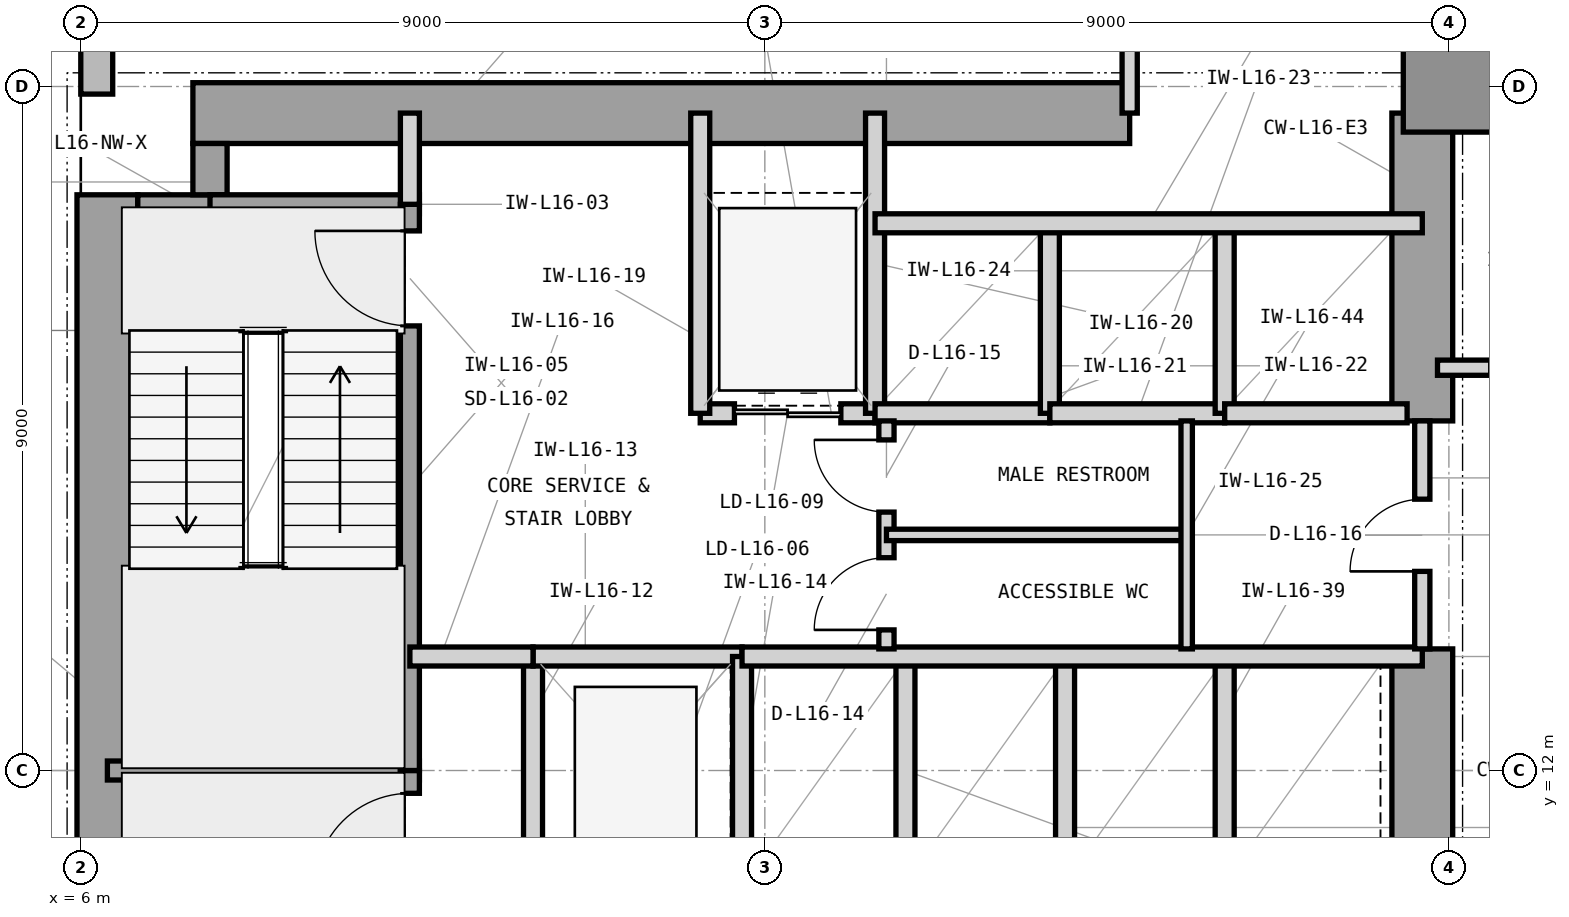
"""IFC4 building model, lengths in metres.
Left out: names, types, materials, properties, quantities, classifications, styles, units other than length and angle.
Written with IfcOpenShell. Run it as: python <this file> out.ifc"""

import sys

from ifc_helpers import new_model, si_unit, direction, frame, frame_2d, origin, origin_2d, place, context, subcontext, project, spatial, rectangle, extrude, element, fill, save


model = new_model("IFC4")
c1 = context("Model", 3, precision=1e-05, world=origin(), true_north=direction((0.0, 1.0)))
c2 = subcontext(c1, "Body", "Model", "MODEL_VIEW")
j1 = project(units=[si_unit("LENGTHUNIT", "METRE"), si_unit("PLANEANGLEUNIT", "RADIAN")], contexts=[c1])
p1 = place(None, origin())
s1 = spatial("IfcSite", under=j1, at=p1, CompositionType="ELEMENT")
p2 = place(p1, origin())
s2 = spatial("IfcBuilding", under=s1, at=p2, CompositionType="ELEMENT")
p3 = place(p2, frame((0.0, 0.0, 72.0)))
s3 = spatial("IfcBuildingStorey", under=s2, at=p3, CompositionType="ELEMENT", Elevation=72.0)
p4 = place(p3, frame((6.35, 4.425, 0.0), z_axis=(0.0, 0.0, 1.0), x_axis=(0.0, 1.0, 0.0)))
e1 = element("IfcWall", 1, at=p4, inside=s3, PredefinedType="SHEAR", context=c2, shape_type="SweptSolid", body=[
    extrude(rectangle(XDim=15.15, YDim=0.8, at=frame_2d((7.575, 0.0))), origin(), (0.0, 0.0, 1.0), 4.2),
])
p5 = place(p3, frame((7.475, 20.65, 0.0), z_axis=(0.0, 0.0, 1.0), x_axis=(1.0, 0.0, 0.0)))
e2 = element("IfcWall", 2, at=p5, inside=s3, PredefinedType="SHEAR", context=c2, shape_type="SweptSolid", body=[
    extrude(rectangle(XDim=12.325, YDim=0.8, at=frame_2d((6.163, 0.0))), origin(), (0.0, 0.0, 1.0), 4.2),
])
p6 = place(p3, frame((23.65, 10.4, 0.0), z_axis=(0.0, 0.0, 1.0), x_axis=(0.0, 1.0, 0.0)))
e3 = element("IfcWall", 3, at=p6, inside=s3, PredefinedType="SHEAR", context=c2, shape_type="SweptSolid", body=[
    extrude(rectangle(XDim=3.2, YDim=0.8, at=frame_2d((1.6, 0.0))), origin(), (0.0, 0.0, 1.0), 4.2),
])
p7 = place(p3, frame((23.65, 16.6, 0.0), z_axis=(0.0, 0.0, 1.0), x_axis=(0.0, 1.0, 0.0)))
e4 = element("IfcWall", 4, at=p7, inside=s3, PredefinedType="SHEAR", context=c2, shape_type="SweptSolid", body=[
    extrude(rectangle(XDim=4.05, YDim=0.8, at=frame_2d((2.025, 0.0))), origin(), (0.0, 0.0, 1.0), 4.2),
])
p8 = place(p3, frame((6.75, 19.35, 0.0), z_axis=(0.0, 0.0, 1.0), x_axis=(1.0, 0.0, 0.0)))
e5 = element("IfcWall", 5, at=p8, inside=s3, PredefinedType="SHEAR", context=c2, shape_type="SweptSolid", body=[
    extrude(rectangle(XDim=1.175, YDim=0.45, at=frame_2d((0.587, 0.0))), origin(), (0.0, 0.0, 1.0), 4.2),
])
p9 = place(p3, frame((7.7, 19.575, 0.0), z_axis=(0.0, 0.0, 1.0), x_axis=(0.0, 1.0, 0.0)))
e6 = element("IfcWall", 6, at=p9, inside=s3, PredefinedType="SHEAR", context=c2, shape_type="SweptSolid", body=[
    extrude(rectangle(XDim=0.675, YDim=0.45, at=frame_2d((0.337, 0.0))), origin(), (0.0, 0.0, 1.0), 4.2),
])
p10 = place(p3, frame((24.0, 21.0, 0.0), z_axis=(0.0, 0.0, 1.0), x_axis=(1.0, 0.0, 0.0)))
e7 = element("IfcColumn", 7, at=p10, inside=s3, PredefinedType="COLUMN", context=c2, shape_type="SweptSolid", body=[
    extrude(rectangle(XDim=1.2, YDim=1.2, at=origin_2d()), origin(), (0.0, 0.0, 1.0), 4.2),
])
p11 = place(p3, frame((64.4, 20.79, 0.0), z_axis=(0.0, 0.0, 1.0), x_axis=(-1.0, 0.0, 0.0)))
e8 = element("IfcWall", 8, at=p11, inside=s3, PredefinedType="STANDARD", context=c2, shape_type="SweptSolid", body=[
    extrude(rectangle(XDim=40.4, YDim=0.42, at=frame_2d((20.2, 0.0))), origin(), (0.0, 0.0, 1.0), 3.98),
])
p12 = place(p11, frame((26.375, 0.0, 0.85)))
e9 = element("IfcOpeningElement", 9, at=p12, cuts=e8, PredefinedType="OPENING", context=c2, shape_type="SweptSolid", body=[
    extrude(rectangle(XDim=2.8, YDim=2.45, at=frame_2d((1.4, 1.225))), frame((0.0, 0.22, 0.0), z_axis=(0.0, -1.0, 0.0), x_axis=(1.0, 0.0, 0.0)), (0.0, 0.0, 1.0), 0.44),
])
p13 = place(p11, frame((38.222, 0.0, 0.85)))
e10 = element("IfcOpeningElement", 10, at=p13, cuts=e8, PredefinedType="OPENING", context=c2, shape_type="SweptSolid", body=[
    extrude(rectangle(XDim=1.2, YDim=2.45, at=frame_2d((0.6, 1.225))), frame((0.0, 0.22, 0.0), z_axis=(0.0, -1.0, 0.0), x_axis=(1.0, 0.0, 0.0)), (0.0, 0.0, 1.0), 0.44),
])
p14 = place(p11, frame((32.536, 0.0, 0.85)))
e11 = element("IfcOpeningElement", 11, at=p14, cuts=e8, PredefinedType="OPENING", context=c2, shape_type="SweptSolid", body=[
    extrude(rectangle(XDim=2.8, YDim=2.45, at=frame_2d((1.4, 1.225))), frame((0.0, 0.22, 0.0), z_axis=(0.0, -1.0, 0.0), x_axis=(1.0, 0.0, 0.0)), (0.0, 0.0, 1.0), 0.44),
])
p15 = place(p11, frame((17.386, 0.0, 0.85)))
e12 = element("IfcOpeningElement", 12, at=p15, cuts=e8, PredefinedType="OPENING", context=c2, shape_type="SweptSolid", body=[
    extrude(rectangle(XDim=2.8, YDim=2.45, at=frame_2d((1.4, 1.225))), frame((0.0, 0.22, 0.0), z_axis=(0.0, -1.0, 0.0), x_axis=(1.0, 0.0, 0.0)), (0.0, 0.0, 1.0), 0.44),
])
p16 = place(p3, frame((23.79, 21.0, 0.0), z_axis=(0.0, 0.0, 1.0), x_axis=(0.0, 1.0, 0.0)))
e13 = element("IfcWall", 13, at=p16, inside=s3, PredefinedType="STANDARD", context=c2, shape_type="SweptSolid", body=[
    extrude(rectangle(XDim=28.4, YDim=0.42, at=frame_2d((14.2, 0.0))), origin(), (0.0, 0.0, 1.0), 3.98),
])
p17 = place(p16, frame((10.433, 0.0, 0.85)))
e14 = element("IfcOpeningElement", 14, at=p17, cuts=e13, PredefinedType="OPENING", context=c2, shape_type="SweptSolid", body=[
    extrude(rectangle(XDim=2.8, YDim=2.45, at=frame_2d((1.4, 1.225))), frame((0.0, 0.22, 0.0), z_axis=(0.0, -1.0, 0.0), x_axis=(1.0, 0.0, 0.0)), (0.0, 0.0, 1.0), 0.44),
])
p18 = place(p16, frame((16.016, 0.0, 0.85)))
e15 = element("IfcOpeningElement", 15, at=p18, cuts=e13, PredefinedType="OPENING", context=c2, shape_type="SweptSolid", body=[
    extrude(rectangle(XDim=1.2, YDim=2.45, at=frame_2d((0.6, 1.225))), frame((0.0, 0.22, 0.0), z_axis=(0.0, -1.0, 0.0), x_axis=(1.0, 0.0, 0.0)), (0.0, 0.0, 1.0), 0.44),
])
p19 = place(p3, frame((6.21, 49.4, 0.0), z_axis=(0.0, 0.0, 1.0), x_axis=(0.0, -1.0, 0.0)))
e16 = element("IfcWall", 16, at=p19, inside=s3, PredefinedType="STANDARD", context=c2, shape_type="SweptSolid", body=[
    extrude(rectangle(XDim=28.5, YDim=0.42, at=frame_2d((14.25, 0.0))), origin(), (0.0, 0.0, 1.0), 3.98),
])
p20 = place(p19, frame((15.225, 0.0, 0.85)))
e17 = element("IfcOpeningElement", 17, at=p20, cuts=e16, PredefinedType="OPENING", context=c2, shape_type="SweptSolid", body=[
    extrude(rectangle(XDim=2.8, YDim=2.45, at=frame_2d((1.4, 1.225))), frame((0.0, 0.22, 0.0), z_axis=(0.0, -1.0, 0.0), x_axis=(1.0, 0.0, 0.0)), (0.0, 0.0, 1.0), 0.44),
])
p21 = place(p3, frame((6.35, 12.0, 0.0), z_axis=(0.0, 0.0, 1.0), x_axis=(1.0, 0.0, 0.0)))
e18 = element("IfcWall", 18, at=p21, inside=s3, PredefinedType="SHEAR", context=c2, shape_type="SweptSolid", body=[
    extrude(rectangle(XDim=4.105, YDim=0.25, at=frame_2d((2.052, 0.0))), origin(), (0.0, 0.0, 1.0), 4.2),
])
p22 = place(p3, frame((7.7, 19.45, 0.0), z_axis=(0.0, 0.0, 1.0), x_axis=(1.0, 0.0, 0.0)))
e19 = element("IfcWall", 19, at=p22, inside=s3, PredefinedType="SHEAR", context=c2, shape_type="SweptSolid", body=[
    extrude(rectangle(XDim=2.755, YDim=0.25, at=frame_2d((1.377, 0.0))), origin(), (0.0, 0.0, 1.0), 4.2),
])
p23 = place(p3, frame((10.33, 4.55, 0.0), z_axis=(0.0, 0.0, 1.0), x_axis=(0.0, 1.0, 0.0)))
e20 = element("IfcWall", 20, at=p23, inside=s3, PredefinedType="SHEAR", context=c2, shape_type="SweptSolid", body=[
    extrude(rectangle(XDim=7.45, YDim=0.25, at=frame_2d((3.725, 0.0))), origin(), (0.0, 0.0, 1.0), 4.2),
])
p24 = place(p23, frame((5.9, 0.0, 0.0)))
e21 = element("IfcOpeningElement", 21, at=p24, cuts=e20, PredefinedType="OPENING", context=c2, shape_type="SweptSolid", body=[
    extrude(rectangle(XDim=1.25, YDim=2.2, at=frame_2d((0.625, 1.1))), frame((0.0, 0.135, 0.0), z_axis=(0.0, -1.0, 0.0), x_axis=(1.0, 0.0, 0.0)), (0.0, 0.0, 1.0), 0.27),
])
p25 = place(p3, frame((10.33, 12.0, 0.0), z_axis=(0.0, 0.0, 1.0), x_axis=(0.0, 1.0, 0.0)))
e22 = element("IfcWall", 22, at=p25, inside=s3, PredefinedType="SHEAR", context=c2, shape_type="SweptSolid", body=[
    extrude(rectangle(XDim=7.45, YDim=0.25, at=frame_2d((3.725, 0.0))), origin(), (0.0, 0.0, 1.0), 4.2),
])
p26 = place(p25, frame((5.85, 0.0, 0.0)))
e23 = element("IfcOpeningElement", 23, at=p26, cuts=e22, PredefinedType="OPENING", context=c2, shape_type="SweptSolid", body=[
    extrude(rectangle(XDim=1.25, YDim=2.2, at=frame_2d((0.625, 1.1))), frame((0.0, 0.135, 0.0), z_axis=(0.0, -1.0, 0.0), x_axis=(1.0, 0.0, 0.0)), (0.0, 0.0, 1.0), 0.27),
])
p27 = place(p3, frame((10.33, 19.45, 0.0), z_axis=(0.0, 0.0, 1.0), x_axis=(0.0, 1.0, 0.0)))
e24 = element("IfcWall", 24, at=p27, inside=s3, PredefinedType="PARTITIONING", context=c2, shape_type="SweptSolid", body=[
    extrude(rectangle(XDim=1.2, YDim=0.25, at=frame_2d((0.6, 0.0))), origin(), (0.0, 0.0, 1.0), 3.114),
])
p28 = place(p3, frame((11.95, 10.5, 0.0), z_axis=(0.0, 0.0, 1.0), x_axis=(0.0, 1.0, 0.0)))
e25 = element("IfcWall", 25, at=p28, inside=s3, PredefinedType="PARTITIONING", context=c2, shape_type="SweptSolid", body=[
    extrude(rectangle(XDim=3.0, YDim=0.25, at=frame_2d((1.5, 0.0))), origin(), (0.0, 0.0, 1.0), 3.97),
])
p29 = place(p3, frame((11.95, 13.5, 0.0), z_axis=(0.0, 0.0, 1.0), x_axis=(1.0, 0.0, 0.0)))
e26 = element("IfcWall", 26, at=p29, inside=s3, PredefinedType="PARTITIONING", context=c2, shape_type="SweptSolid", body=[
    extrude(rectangle(XDim=2.75, YDim=0.25, at=frame_2d((1.375, 0.0))), origin(), (0.0, 0.0, 1.0), 3.426),
])
p30 = place(p3, frame((14.7, 10.5, 0.0), z_axis=(0.0, 0.0, 1.0), x_axis=(0.0, 1.0, 0.0)))
e27 = element("IfcWall", 27, at=p30, inside=s3, PredefinedType="PARTITIONING", context=c2, shape_type="SweptSolid", body=[
    extrude(rectangle(XDim=3.0, YDim=0.25, at=frame_2d((1.5, 0.0))), origin(), (0.0, 0.0, 1.0), 3.97),
])
p31 = place(p3, frame((10.33, 13.5, 0.0), z_axis=(0.0, 0.0, 1.0), x_axis=(1.0, 0.0, 0.0)))
e28 = element("IfcWall", 28, at=p31, inside=s3, PredefinedType="PARTITIONING", context=c2, shape_type="SweptSolid", body=[
    extrude(rectangle(XDim=1.62, YDim=0.25, at=frame_2d((0.81, 0.0))), origin(), (0.0, 0.0, 1.0), 3.426),
])
p32 = place(p3, frame((14.15, 16.7, 0.0), z_axis=(0.0, 0.0, 1.0), x_axis=(1.0, 0.0, 0.0)))
e29 = element("IfcWall", 29, at=p32, inside=s3, PredefinedType="PARTITIONING", context=c2, shape_type="SweptSolid", body=[
    extrude(rectangle(XDim=2.3, YDim=0.25, at=frame_2d((1.15, 0.0))), origin(), (0.0, 0.0, 1.0), 3.426),
])
p33 = place(p32, frame((0.45, 0.0, 0.0)))
e30 = element("IfcOpeningElement", 30, at=p33, cuts=e29, PredefinedType="OPENING", context=c2, shape_type="SweptSolid", body=[
    extrude(rectangle(XDim=1.4, YDim=2.35, at=frame_2d((0.7, 1.175))), frame((0.0, 0.135, 0.0), z_axis=(0.0, -1.0, 0.0), x_axis=(1.0, 0.0, 0.0)), (0.0, 0.0, 1.0), 0.27),
])
for number, where, z_axis, x_axis in (
    (31, (14.15, 16.7, 0.0), (0.0, 0.0, 1.0), (0.0, 1.0, 0.0)),
    (32, (16.45, 16.7, 0.0), (0.0, 0.0, 1.0), (0.0, 1.0, 0.0)),
):
    element("IfcWall", number, at=place(p3, frame(where, z_axis=z_axis, x_axis=x_axis)), inside=s3, PredefinedType="PARTITIONING", context=c2, shape_type="SweptSolid", body=[
        extrude(rectangle(XDim=3.95, YDim=0.25, at=frame_2d((1.975, 0.0))), origin(), (0.0, 0.0, 1.0), 3.97),
    ])
p34 = place(p3, frame((16.45, 16.7, 0.0), z_axis=(0.0, 0.0, 1.0), x_axis=(1.0, 0.0, 0.0)))
e33 = element("IfcWall", 33, at=p34, inside=s3, PredefinedType="PARTITIONING", context=c2, shape_type="SweptSolid", body=[
    extrude(rectangle(XDim=2.3, YDim=0.25, at=frame_2d((1.15, 0.0))), origin(), (0.0, 0.0, 1.0), 3.426),
])
p35 = place(p3, frame((18.75, 16.7, 0.0), z_axis=(0.0, 0.0, 1.0), x_axis=(0.0, 1.0, 0.0)))
e34 = element("IfcWall", 34, at=p35, inside=s3, PredefinedType="PARTITIONING", context=c2, shape_type="SweptSolid", body=[
    extrude(rectangle(XDim=2.5, YDim=0.25, at=frame_2d((1.25, 0.0))), origin(), (0.0, 0.0, 1.0), 3.97),
])
p36 = place(p3, frame((18.75, 16.7, 0.0), z_axis=(0.0, 0.0, 1.0), x_axis=(1.0, 0.0, 0.0)))
e35 = element("IfcWall", 35, at=p36, inside=s3, PredefinedType="PARTITIONING", context=c2, shape_type="SweptSolid", body=[
    extrude(rectangle(XDim=2.3, YDim=0.25, at=frame_2d((1.15, 0.0))), origin(), (0.0, 0.0, 1.0), 3.426),
])
p37 = place(p3, frame((21.05, 16.7, 0.0), z_axis=(0.0, 0.0, 1.0), x_axis=(0.0, 1.0, 0.0)))
e36 = element("IfcWall", 36, at=p37, inside=s3, PredefinedType="PARTITIONING", context=c2, shape_type="SweptSolid", body=[
    extrude(rectangle(XDim=2.5, YDim=0.25, at=frame_2d((1.25, 0.0))), origin(), (0.0, 0.0, 1.0), 3.97),
])
p38 = place(p3, frame((21.05, 16.7, 0.0), z_axis=(0.0, 0.0, 1.0), x_axis=(1.0, 0.0, 0.0)))
e37 = element("IfcWall", 37, at=p38, inside=s3, PredefinedType="PARTITIONING", context=c2, shape_type="SweptSolid", body=[
    extrude(rectangle(XDim=2.4, YDim=0.25, at=frame_2d((1.2, 0.0))), origin(), (0.0, 0.0, 1.0), 3.426),
])
p39 = place(p3, frame((16.45, 19.2, 0.0), z_axis=(0.0, 0.0, 1.0), x_axis=(1.0, 0.0, 0.0)))
e38 = element("IfcWall", 38, at=p39, inside=s3, PredefinedType="PARTITIONING", context=c2, shape_type="SweptSolid", body=[
    extrude(rectangle(XDim=7.2, YDim=0.25, at=frame_2d((3.6, 0.0))), origin(), (0.0, 0.0, 1.0), 3.97),
])
for number, where, z_axis, x_axis in (
    (39, (16.85, 10.5, 0.0), (0.0, 0.0, 1.0), (0.0, 1.0, 0.0)),
    (40, (18.95, 10.5, 0.0), (0.0, 0.0, 1.0), (0.0, 1.0, 0.0)),
    (41, (21.05, 10.5, 0.0), (0.0, 0.0, 1.0), (0.0, 1.0, 0.0)),
):
    element("IfcWall", number, at=place(p3, frame(where, z_axis=z_axis, x_axis=x_axis)), inside=s3, PredefinedType="PARTITIONING", context=c2, shape_type="SweptSolid", body=[
        extrude(rectangle(XDim=3.0, YDim=0.25, at=frame_2d((1.5, 0.0))), origin(), (0.0, 0.0, 1.0), 3.97),
    ])
p40 = place(p3, frame((14.7, 13.5, 0.0), z_axis=(0.0, 0.0, 1.0), x_axis=(1.0, 0.0, 0.0)))
e42 = element("IfcWall", 42, at=p40, inside=s3, PredefinedType="PARTITIONING", context=c2, shape_type="SweptSolid", body=[
    extrude(rectangle(XDim=8.95, YDim=0.25, at=frame_2d((4.475, 0.0))), origin(), (0.0, 0.0, 1.0), 3.426),
])
p41 = place(p3, frame((16.6, 13.6, 0.0), z_axis=(0.0, 0.0, 1.0), x_axis=(0.0, 1.0, 0.0)))
e43 = element("IfcWall", 43, at=p41, inside=s3, PredefinedType="PARTITIONING", context=c2, shape_type="SweptSolid", body=[
    extrude(rectangle(XDim=3.0, YDim=0.2, at=frame_2d((1.5, 0.0))), origin(), (0.0, 0.0, 1.0), 3.97),
])
p42 = place(p41, frame((0.25, 0.0, 0.0)))
e44 = element("IfcOpeningElement", 44, at=p42, cuts=e43, PredefinedType="OPENING", context=c2, shape_type="SweptSolid", body=[
    extrude(rectangle(XDim=0.95, YDim=2.1, at=frame_2d((0.475, 1.05))), frame((0.0, 0.11, 0.0), z_axis=(0.0, -1.0, 0.0), x_axis=(1.0, 0.0, 0.0)), (0.0, 0.0, 1.0), 0.22),
])
p43 = place(p41, frame((1.8, 0.0, 0.0)))
e45 = element("IfcOpeningElement", 45, at=p43, cuts=e43, PredefinedType="OPENING", context=c2, shape_type="SweptSolid", body=[
    extrude(rectangle(XDim=0.95, YDim=2.1, at=frame_2d((0.475, 1.05))), frame((0.0, 0.11, 0.0), z_axis=(0.0, -1.0, 0.0), x_axis=(1.0, 0.0, 0.0)), (0.0, 0.0, 1.0), 0.22),
])
p44 = place(p3, frame((16.6, 15.1, 0.0), z_axis=(0.0, 0.0, 1.0), x_axis=(1.0, 0.0, 0.0)))
e46 = element("IfcWall", 46, at=p44, inside=s3, PredefinedType="PARTITIONING", context=c2, shape_type="SweptSolid", body=[
    extrude(rectangle(XDim=3.95, YDim=0.15, at=frame_2d((1.975, 0.0))), origin(), (0.0, 0.0, 1.0), 3.97),
])
p45 = place(p3, frame((20.55, 13.6, 0.0), z_axis=(0.0, 0.0, 1.0), x_axis=(0.0, 1.0, 0.0)))
e47 = element("IfcWall", 47, at=p45, inside=s3, PredefinedType="PARTITIONING", context=c2, shape_type="SweptSolid", body=[
    extrude(rectangle(XDim=3.0, YDim=0.15, at=frame_2d((1.5, 0.0))), origin(), (0.0, 0.0, 1.0), 3.97),
])
p46 = place(p3, frame((23.65, 13.6, 0.0), z_axis=(0.0, 0.0, 1.0), x_axis=(0.0, 1.0, 0.0)))
e48 = element("IfcWall", 48, at=p46, inside=s3, PredefinedType="PARTITIONING", context=c2, shape_type="SweptSolid", body=[
    extrude(rectangle(XDim=3.0, YDim=0.2, at=frame_2d((1.5, 0.0))), origin(), (0.0, 0.0, 1.0), 3.97),
])
p47 = place(p46, frame((1.02, 0.0, 0.0)))
e49 = element("IfcOpeningElement", 49, at=p47, cuts=e48, PredefinedType="OPENING", context=c2, shape_type="SweptSolid", body=[
    extrude(rectangle(XDim=0.95, YDim=2.1, at=frame_2d((0.475, 1.05))), frame((0.0, 0.11, 0.0), z_axis=(0.0, -1.0, 0.0), x_axis=(1.0, 0.0, 0.0)), (0.0, 0.0, 1.0), 0.22),
])
p48 = place(p3, frame((23.85, 17.3, 0.0), z_axis=(0.0, 0.0, 1.0), x_axis=(1.0, 0.0, 0.0)))
e50 = element("IfcWall", 50, at=p48, inside=s3, PredefinedType="PARTITIONING", context=c2, shape_type="SweptSolid", body=[
    extrude(rectangle(XDim=2.85, YDim=0.2, at=frame_2d((1.425, 0.0))), origin(), (0.0, 0.0, 1.0), 3.97),
])
p49 = place(p48, frame((0.7, 0.0, 0.0)))
e51 = element("IfcOpeningElement", 51, at=p49, cuts=e50, PredefinedType="OPENING", context=c2, shape_type="SweptSolid", body=[
    extrude(rectangle(XDim=1.0, YDim=2.15, at=frame_2d((0.5, 1.075))), frame((0.0, 0.11, 0.0), z_axis=(0.0, -1.0, 0.0), x_axis=(1.0, 0.0, 0.0)), (0.0, 0.0, 1.0), 0.22),
])
p50 = place(p3, frame((19.8, 20.65, 0.0), z_axis=(0.0, 0.0, 1.0), x_axis=(0.0, 1.0, 0.0)))
e52 = element("IfcWall", 52, at=p50, inside=s3, PredefinedType="PARTITIONING", context=c2, shape_type="SweptSolid", body=[
    extrude(rectangle(XDim=6.15, YDim=0.2, at=frame_2d((3.075, 0.0))), origin(), (0.0, 0.0, 1.0), 3.97),
])
p51 = place(p24, origin())
e53 = element("IfcDoor", 53, at=p51, inside=s3, OperationType="SINGLE_SWING_LEFT", PredefinedType="DOOR", context=c2, shape_type="SweptSolid", body=[
    extrude(rectangle(XDim=1.25, YDim=2.2, at=frame_2d((0.625, 1.1))), frame((0.0, 0.025, 0.0), z_axis=(0.0, -1.0, 0.0), x_axis=(1.0, 0.0, 0.0)), (0.0, 0.0, 1.0), 0.05),
])
fill(e21, e53)
p52 = place(p26, origin())
e54 = element("IfcDoor", 54, at=p52, inside=s3, OperationType="SINGLE_SWING_RIGHT", PredefinedType="DOOR", context=c2, shape_type="SweptSolid", body=[
    extrude(rectangle(XDim=1.25, YDim=2.2, at=frame_2d((0.625, 1.1))), frame((0.0, 0.025, 0.0), z_axis=(0.0, -1.0, 0.0), x_axis=(1.0, 0.0, 0.0)), (0.0, 0.0, 1.0), 0.05),
])
fill(e23, e54)
p53 = place(p33, origin())
e55 = element("IfcDoor", 55, at=p53, inside=s3, OperationType="DOUBLE_DOOR_SLIDING", PredefinedType="DOOR", context=c2, shape_type="SweptSolid", body=[
    extrude(rectangle(XDim=1.4, YDim=2.35, at=frame_2d((0.7, 1.175))), frame((0.0, 0.025, 0.0), z_axis=(0.0, -1.0, 0.0), x_axis=(1.0, 0.0, 0.0)), (0.0, 0.0, 1.0), 0.05),
])
fill(e30, e55)
p54 = place(p42, origin())
e56 = element("IfcDoor", 56, at=p54, inside=s3, OperationType="SINGLE_SWING_LEFT", PredefinedType="DOOR", context=c2, shape_type="SweptSolid", body=[
    extrude(rectangle(XDim=0.95, YDim=2.1, at=frame_2d((0.475, 1.05))), frame((0.0, 0.025, 0.0), z_axis=(0.0, -1.0, 0.0), x_axis=(1.0, 0.0, 0.0)), (0.0, 0.0, 1.0), 0.05),
])
fill(e44, e56)
p55 = place(p43, origin())
e57 = element("IfcDoor", 57, at=p55, inside=s3, OperationType="SINGLE_SWING_RIGHT", PredefinedType="DOOR", context=c2, shape_type="SweptSolid", body=[
    extrude(rectangle(XDim=0.95, YDim=2.1, at=frame_2d((0.475, 1.05))), frame((0.0, 0.025, 0.0), z_axis=(0.0, -1.0, 0.0), x_axis=(1.0, 0.0, 0.0)), (0.0, 0.0, 1.0), 0.05),
])
fill(e45, e57)
p56 = place(p47, origin())
e58 = element("IfcDoor", 58, at=p56, inside=s3, OperationType="SINGLE_SWING_LEFT", PredefinedType="DOOR", context=c2, shape_type="SweptSolid", body=[
    extrude(rectangle(XDim=0.95, YDim=2.1, at=frame_2d((0.475, 1.05))), frame((0.0, 0.025, 0.0), z_axis=(0.0, -1.0, 0.0), x_axis=(1.0, 0.0, 0.0)), (0.0, 0.0, 1.0), 0.05),
])
fill(e49, e58)
save(model, sys.argv[1])
